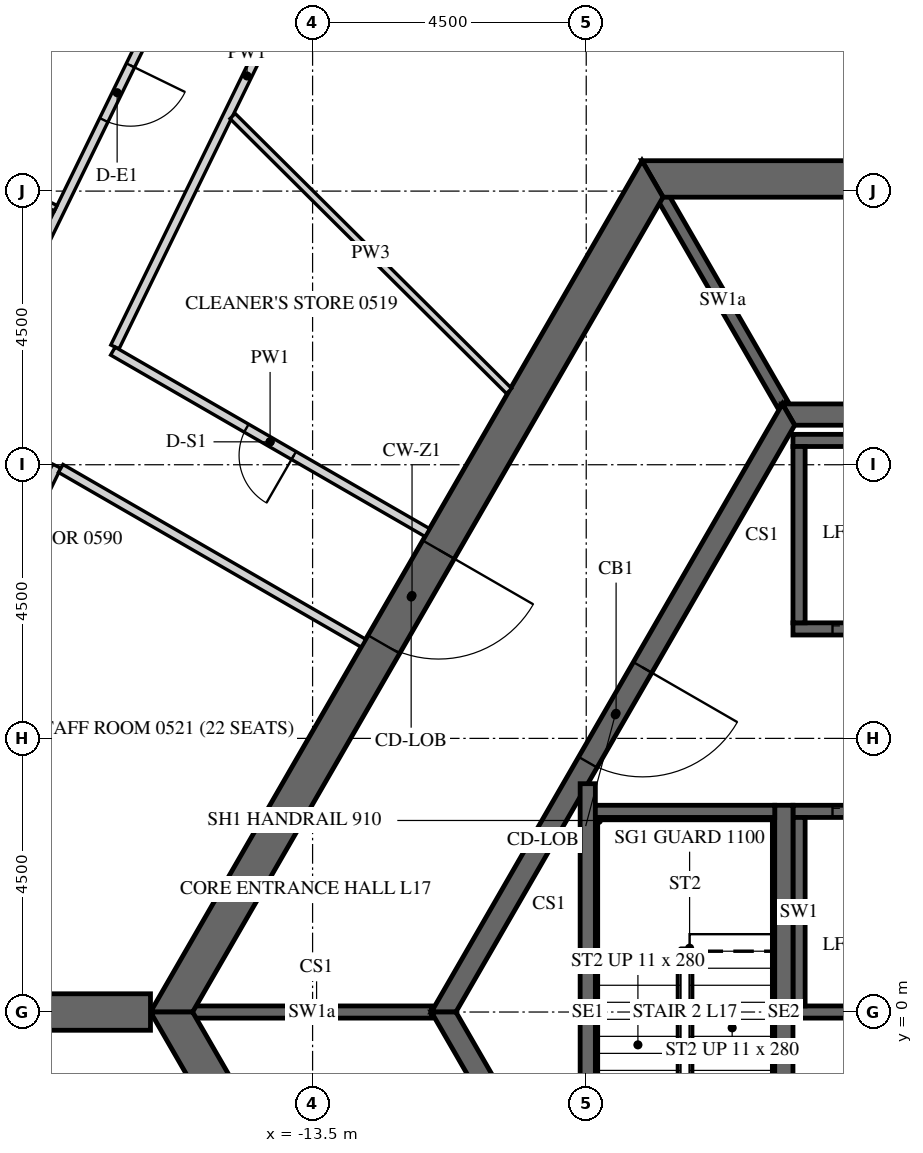
"""IFC4 building model, lengths in metres.
Left out: names, types, materials, properties, quantities, classifications, styles, units other than length and angle.
Written with IfcOpenShell. Run it as: python <this file> out.ifc"""

import sys

from ifc_helpers import new_model, si_unit, direction, frame, frame_2d, origin, place, context, subcontext, project, spatial, polyline, rectangle, outline, extrude, element, fill, save


model = new_model("IFC4")
c1 = context("Model", 3, precision=1e-05, world=origin(), true_north=direction((0.0, 1.0)))
c2 = subcontext(c1, "Body", "Model", "MODEL_VIEW")
j1 = project(units=[si_unit("LENGTHUNIT", "METRE"), si_unit("PLANEANGLEUNIT", "RADIAN")], contexts=[c1])
p1 = place(None, origin())
s1 = spatial("IfcSite", under=j1, at=p1, CompositionType="ELEMENT")
p2 = place(p1, origin())
s2 = spatial("IfcBuilding", under=s1, at=p2, CompositionType="ELEMENT")
p3 = place(p2, frame((0.0, 0.0, 80.4)))
s3 = spatial("IfcBuildingStorey", under=s2, at=p3, CompositionType="ELEMENT", Elevation=80.4)
p4 = place(p3, frame((-7.91, 13.7, -0.15), z_axis=(0.0, 0.0, 1.0), x_axis=(-0.499999880136, -0.866025472988, 0.0)))
e1 = element("IfcWall", 1, at=p4, inside=s3, PredefinedType="SHEAR", context=c2, shape_type="SweptSolid", body=[
    extrude(outline(polyline([(-0.173, -0.3), (15.993, -0.3), (15.646, 0.3), (0.173, 0.3), (-0.173, -0.3)])), origin(), (0.0, 0.0, 1.0), 3.9),
])
p5 = place(p4, frame((7.039, 0.0, 0.15)))
e2 = element("IfcOpeningElement", 2, at=p5, cuts=e1, PredefinedType="OPENING", context=c2, shape_type="SweptSolid", body=[
    extrude(rectangle(XDim=1.8, YDim=2.4, at=frame_2d((0.9, 1.2))), frame((0.0, 0.31, 0.0), z_axis=(0.0, -1.0, 0.0), x_axis=(1.0, 0.0, 0.0)), (0.0, 0.0, 1.0), 0.62),
])
p6 = place(p3, frame((-15.819, 0.0, -0.15), z_axis=(0.0, 0.0, 1.0), x_axis=(0.499999880136, -0.866025472988, 0.0)))
e3 = element("IfcWall", 3, at=p6, inside=s3, PredefinedType="SHEAR", context=c2, shape_type="SweptSolid", body=[
    extrude(outline(polyline([(-0.173, -0.3), (15.993, -0.3), (15.646, 0.3), (0.173, 0.3), (-0.173, -0.3)])), origin(), (0.0, 0.0, 1.0), 3.9),
])
p7 = place(p6, frame((6.981, 0.0, 0.15)))
e4 = element("IfcOpeningElement", 4, at=p7, cuts=e3, PredefinedType="OPENING", context=c2, shape_type="SweptSolid", body=[
    extrude(rectangle(XDim=1.8, YDim=2.4, at=frame_2d((0.9, 1.2))), frame((0.0, 0.31, 0.0), z_axis=(0.0, -1.0, 0.0), x_axis=(1.0, 0.0, 0.0)), (0.0, 0.0, 1.0), 0.62),
])
p8 = place(p3, frame((7.91, 13.7, -0.15), z_axis=(0.0, 0.0, 1.0), x_axis=(-1.0, 0.0, 0.0)))
e5 = element("IfcWall", 5, at=p8, inside=s3, PredefinedType="SHEAR", context=c2, shape_type="SweptSolid", body=[
    extrude(outline(polyline([(-0.173, -0.3), (15.993, -0.3), (15.646, 0.3), (0.173, 0.3), (-0.173, -0.3)])), origin(), (0.0, 0.0, 1.0), 3.9),
])
p9 = place(p8, frame((7.31, 0.0, 0.15)))
e6 = element("IfcOpeningElement", 6, at=p9, cuts=e5, PredefinedType="OPENING", context=c2, shape_type="SweptSolid", body=[
    extrude(rectangle(XDim=1.2, YDim=2.4, at=frame_2d((0.6, 1.2))), frame((0.0, 0.31, 0.0), z_axis=(0.0, -1.0, 0.0), x_axis=(1.0, 0.0, 0.0)), (0.0, 0.0, 1.0), 0.62),
])
p10 = place(p3, frame((-16.166, 0.0, -0.15), z_axis=(0.0, 0.0, 1.0), x_axis=(-1.0, 0.0, 0.0)))
e7 = element("IfcWall", 7, at=p10, inside=s3, PredefinedType="SHEAR", context=c2, shape_type="SweptSolid", body=[
    extrude(rectangle(XDim=16.509, YDim=0.6, at=frame_2d((8.254, 0.0))), origin(), (0.0, 0.0, 1.0), 3.9),
])
p11 = place(p10, frame((7.354, 0.0, 0.15)))
e8 = element("IfcOpeningElement", 8, at=p11, cuts=e7, PredefinedType="OPENING", context=c2, shape_type="SweptSolid", body=[
    extrude(rectangle(XDim=1.8, YDim=2.4, at=frame_2d((0.9, 1.2))), frame((0.0, 0.31, 0.0), z_axis=(0.0, -1.0, 0.0), x_axis=(1.0, 0.0, 0.0)), (0.0, 0.0, 1.0), 0.62),
])
p12 = place(p3, frame((-5.673, 9.825, -0.15), z_axis=(0.0, 0.0, 1.0), x_axis=(-0.499995046907, -0.866028263435, 0.0)))
e9 = element("IfcWall", 9, at=p12, inside=s3, PredefinedType="SHEAR", context=c2, shape_type="SweptSolid", body=[
    extrude(outline(polyline([(-0.101, -0.175), (11.446, -0.175), (11.244, 0.175), (0.101, 0.175), (-0.101, -0.175)])), origin(), (0.0, 0.0, 1.0), 3.9),
])
p13 = place(p12, frame((4.801, 0.0, 0.15)))
e10 = element("IfcOpeningElement", 10, at=p13, cuts=e9, PredefinedType="OPENING", context=c2, shape_type="SweptSolid", body=[
    extrude(rectangle(XDim=1.8, YDim=2.4, at=frame_2d((0.9, 1.2))), frame((0.0, 0.185, 0.0), z_axis=(0.0, -1.0, 0.0), x_axis=(1.0, 0.0, 0.0)), (0.0, 0.0, 1.0), 0.37),
])
p14 = place(p3, frame((-11.345, 0.0, -0.15), z_axis=(0.0, 0.0, 1.0), x_axis=(0.499995046907, -0.866028263435, 0.0)))
e11 = element("IfcWall", 11, at=p14, inside=s3, PredefinedType="SHEAR", context=c2, shape_type="SweptSolid", body=[
    extrude(outline(polyline([(-0.101, -0.175), (11.446, -0.175), (11.244, 0.175), (0.101, 0.175), (-0.101, -0.175)])), origin(), (0.0, 0.0, 1.0), 3.9),
])
p15 = place(p14, frame((4.744, 0.0, 0.15)))
e12 = element("IfcOpeningElement", 12, at=p15, cuts=e11, PredefinedType="OPENING", context=c2, shape_type="SweptSolid", body=[
    extrude(rectangle(XDim=1.8, YDim=2.4, at=frame_2d((0.9, 1.2))), frame((0.0, 0.185, 0.0), z_axis=(0.0, -1.0, 0.0), x_axis=(1.0, 0.0, 0.0)), (0.0, 0.0, 1.0), 0.37),
])
p16 = place(p3, frame((5.673, 9.825, -0.15), z_axis=(0.0, 0.0, 1.0), x_axis=(-1.0, 0.0, 0.0)))
e13 = element("IfcWall", 13, at=p16, inside=s3, PredefinedType="SHEAR", context=c2, shape_type="SweptSolid", body=[
    extrude(outline(polyline([(-0.101, -0.175), (11.446, -0.175), (11.244, 0.175), (0.101, 0.175), (-0.101, -0.175)])), origin(), (0.0, 0.0, 1.0), 3.9),
])
p17 = place(p3, frame((-5.6, 6.3, -0.25), z_axis=(0.0, 0.0, 1.0), x_axis=(1.0, 0.0, 0.0)))
e14 = element("IfcWall", 14, at=p17, inside=s3, PredefinedType="SHEAR", context=c2, shape_type="SweptSolid", body=[
    extrude(rectangle(XDim=11.2, YDim=0.2, at=frame_2d((5.6, 0.0))), origin(), (0.0, 0.0, 1.0), 3.9),
])
p18 = place(p17, frame((0.65, 0.0, 0.25)))
e15 = element("IfcOpeningElement", 15, at=p18, cuts=e14, PredefinedType="OPENING", context=c2, shape_type="SweptSolid", body=[
    extrude(rectangle(XDim=1.1, YDim=2.1, at=frame_2d((0.55, 1.05))), frame((0.0, 0.11, 0.0), z_axis=(0.0, -1.0, 0.0), x_axis=(1.0, 0.0, 0.0)), (0.0, 0.0, 1.0), 0.22),
])
p19 = place(p17, frame((2.85, 0.0, 0.25)))
e16 = element("IfcOpeningElement", 16, at=p19, cuts=e14, PredefinedType="OPENING", context=c2, shape_type="SweptSolid", body=[
    extrude(rectangle(XDim=1.1, YDim=2.1, at=frame_2d((0.55, 1.05))), frame((0.0, 0.11, 0.0), z_axis=(0.0, -1.0, 0.0), x_axis=(1.0, 0.0, 0.0)), (0.0, 0.0, 1.0), 0.22),
])
p20 = place(p17, frame((5.05, 0.0, 0.25)))
e17 = element("IfcOpeningElement", 17, at=p20, cuts=e14, PredefinedType="OPENING", context=c2, shape_type="SweptSolid", body=[
    extrude(rectangle(XDim=1.1, YDim=2.1, at=frame_2d((0.55, 1.05))), frame((0.0, 0.11, 0.0), z_axis=(0.0, -1.0, 0.0), x_axis=(1.0, 0.0, 0.0)), (0.0, 0.0, 1.0), 0.22),
])
p21 = place(p17, frame((7.25, 0.0, 0.25)))
e18 = element("IfcOpeningElement", 18, at=p21, cuts=e14, PredefinedType="OPENING", context=c2, shape_type="SweptSolid", body=[
    extrude(rectangle(XDim=1.1, YDim=2.1, at=frame_2d((0.55, 1.05))), frame((0.0, 0.11, 0.0), z_axis=(0.0, -1.0, 0.0), x_axis=(1.0, 0.0, 0.0)), (0.0, 0.0, 1.0), 0.22),
])
p22 = place(p17, frame((9.45, 0.0, 0.25)))
e19 = element("IfcOpeningElement", 19, at=p22, cuts=e14, PredefinedType="OPENING", context=c2, shape_type="SweptSolid", body=[
    extrude(rectangle(XDim=1.1, YDim=2.1, at=frame_2d((0.55, 1.05))), frame((0.0, 0.11, 0.0), z_axis=(0.0, -1.0, 0.0), x_axis=(1.0, 0.0, 0.0)), (0.0, 0.0, 1.0), 0.22),
])
p23 = place(p3, frame((-5.6, 9.4, -0.25), z_axis=(0.0, 0.0, 1.0), x_axis=(1.0, 0.0, 0.0)))
e20 = element("IfcWall", 20, at=p23, inside=s3, PredefinedType="SHEAR", context=c2, shape_type="SweptSolid", body=[
    extrude(rectangle(XDim=11.2, YDim=0.2, at=frame_2d((5.6, 0.0))), origin(), (0.0, 0.0, 1.0), 3.9),
])
p24 = place(p3, frame((-5.5, 6.4, -0.25), z_axis=(0.0, 0.0, 1.0), x_axis=(0.0, 1.0, 0.0)))
e21 = element("IfcWall", 21, at=p24, inside=s3, PredefinedType="SHEAR", context=c2, shape_type="SweptSolid", body=[
    extrude(rectangle(XDim=2.9, YDim=0.2, at=frame_2d((1.45, 0.0))), origin(), (0.0, 0.0, 1.0), 3.9),
])
p25 = place(p3, frame((-5.6, 3.3, -0.25), z_axis=(0.0, 0.0, 1.0), x_axis=(1.0, 0.0, 0.0)))
e22 = element("IfcWall", 22, at=p25, inside=s3, PredefinedType="SHEAR", context=c2, shape_type="SweptSolid", body=[
    extrude(rectangle(XDim=11.2, YDim=0.2, at=frame_2d((5.6, 0.0))), origin(), (0.0, 0.0, 1.0), 3.9),
])
p26 = place(p25, frame((0.65, 0.0, 0.25)))
e23 = element("IfcOpeningElement", 23, at=p26, cuts=e22, PredefinedType="OPENING", context=c2, shape_type="SweptSolid", body=[
    extrude(rectangle(XDim=1.1, YDim=2.1, at=frame_2d((0.55, 1.05))), frame((0.0, 0.11, 0.0), z_axis=(0.0, -1.0, 0.0), x_axis=(1.0, 0.0, 0.0)), (0.0, 0.0, 1.0), 0.22),
])
p27 = place(p25, frame((2.85, 0.0, 0.25)))
e24 = element("IfcOpeningElement", 24, at=p27, cuts=e22, PredefinedType="OPENING", context=c2, shape_type="SweptSolid", body=[
    extrude(rectangle(XDim=1.1, YDim=2.1, at=frame_2d((0.55, 1.05))), frame((0.0, 0.11, 0.0), z_axis=(0.0, -1.0, 0.0), x_axis=(1.0, 0.0, 0.0)), (0.0, 0.0, 1.0), 0.22),
])
p28 = place(p25, frame((5.05, 0.0, 0.25)))
e25 = element("IfcOpeningElement", 25, at=p28, cuts=e22, PredefinedType="OPENING", context=c2, shape_type="SweptSolid", body=[
    extrude(rectangle(XDim=1.1, YDim=2.1, at=frame_2d((0.55, 1.05))), frame((0.0, 0.11, 0.0), z_axis=(0.0, -1.0, 0.0), x_axis=(1.0, 0.0, 0.0)), (0.0, 0.0, 1.0), 0.22),
])
p29 = place(p25, frame((7.25, 0.0, 0.25)))
e26 = element("IfcOpeningElement", 26, at=p29, cuts=e22, PredefinedType="OPENING", context=c2, shape_type="SweptSolid", body=[
    extrude(rectangle(XDim=1.1, YDim=2.1, at=frame_2d((0.55, 1.05))), frame((0.0, 0.11, 0.0), z_axis=(0.0, -1.0, 0.0), x_axis=(1.0, 0.0, 0.0)), (0.0, 0.0, 1.0), 0.22),
])
p30 = place(p25, frame((9.45, 0.0, 0.25)))
e27 = element("IfcOpeningElement", 27, at=p30, cuts=e22, PredefinedType="OPENING", context=c2, shape_type="SweptSolid", body=[
    extrude(rectangle(XDim=1.1, YDim=2.1, at=frame_2d((0.55, 1.05))), frame((0.0, 0.11, 0.0), z_axis=(0.0, -1.0, 0.0), x_axis=(1.0, 0.0, 0.0)), (0.0, 0.0, 1.0), 0.22),
])
p31 = place(p3, frame((-5.6, 0.0, -0.25), z_axis=(0.0, 0.0, 1.0), x_axis=(1.0, 0.0, 0.0)))
e28 = element("IfcWall", 28, at=p31, inside=s3, PredefinedType="SHEAR", context=c2, shape_type="SweptSolid", body=[
    extrude(rectangle(XDim=11.2, YDim=0.2, at=frame_2d((5.6, 0.0))), origin(), (0.0, 0.0, 1.0), 3.9),
])
p32 = place(p3, frame((-5.5, 0.1, -0.25), z_axis=(0.0, 0.0, 1.0), x_axis=(0.0, 1.0, 0.0)))
e29 = element("IfcWall", 29, at=p32, inside=s3, PredefinedType="SHEAR", context=c2, shape_type="SweptSolid", body=[
    extrude(rectangle(XDim=3.1, YDim=0.2, at=frame_2d((1.55, 0.0))), origin(), (0.0, 0.0, 1.0), 3.9),
])
p33 = place(p3, frame((-5.773, 10.0, -0.15), z_axis=(0.0, 0.0, 1.0), x_axis=(-0.500038251005, 0.86600331843, 0.0)))
e30 = element("IfcWall", 30, at=p33, inside=s3, PredefinedType="SHEAR", context=c2, shape_type="SweptSolid", body=[
    extrude(rectangle(XDim=3.926, YDim=0.2, at=frame_2d((1.963, 0.0))), origin(), (0.0, 0.0, 1.0), 3.9),
])
p34 = place(p3, frame((-11.547, 0.0, -0.15), z_axis=(0.0, 0.0, 1.0), x_axis=(-1.0, 0.0, 0.0)))
e31 = element("IfcWall", 31, at=p34, inside=s3, PredefinedType="SHEAR", context=c2, shape_type="SweptSolid", body=[
    extrude(rectangle(XDim=3.926, YDim=0.2, at=frame_2d((1.963, 0.0))), origin(), (0.0, 0.0, 1.0), 3.9),
])
p35 = place(p3, frame((-5.75, -3.4, -0.25), z_axis=(0.0, 0.0, 1.0), x_axis=(0.0, 1.0, 0.0)))
e32 = element("IfcWall", 32, at=p35, inside=s3, PredefinedType="SHEAR", context=c2, shape_type="SweptSolid", body=[
    extrude(rectangle(XDim=6.8, YDim=0.3, at=frame_2d((3.4, 0.0))), origin(), (0.0, 0.0, 1.0), 3.9),
])
p36 = place(p3, frame((-8.975, -3.755, -0.25), z_axis=(0.0, 0.0, 1.0), x_axis=(0.0, 1.0, 0.0)))
e33 = element("IfcWall", 33, at=p36, inside=s3, PredefinedType="SHEAR", context=c2, shape_type="SweptSolid", body=[
    extrude(rectangle(XDim=7.51, YDim=0.25, at=frame_2d((3.755, 0.0))), origin(), (0.0, 0.0, 1.0), 3.9),
])
p37 = place(p3, frame((-8.85, 3.3, -0.25), z_axis=(0.0, 0.0, 1.0), x_axis=(1.0, 0.0, 0.0)))
e34 = element("IfcWall", 34, at=p37, inside=s3, PredefinedType="SHEAR", context=c2, shape_type="SweptSolid", body=[
    extrude(rectangle(XDim=2.95, YDim=0.2, at=frame_2d((1.475, 0.0))), origin(), (0.0, 0.0, 1.0), 3.9),
])
p38 = place(p3, frame((-13.565, 21.575, 0.0), z_axis=(0.0, 0.0, 1.0), x_axis=(-0.438380787243, -0.898789344272, 0.0)))
e35 = element("IfcWall", 35, at=p38, inside=s3, PredefinedType="PARTITIONING", context=c2, shape_type="SweptSolid", body=[
    extrude(rectangle(XDim=21.668, YDim=0.15, at=frame_2d((10.834, 0.0))), origin(), (0.0, 0.0, 1.0), 2.988),
])
p39 = place(p38, frame((6.684, 0.0, 0.0)))
e36 = element("IfcOpeningElement", 36, at=p39, cuts=e35, PredefinedType="OPENING", context=c2, shape_type="SweptSolid", body=[
    extrude(rectangle(XDim=1.0, YDim=2.1, at=frame_2d((0.5, 1.05))), frame((0.0, 0.085, 0.0), z_axis=(0.0, -1.0, 0.0), x_axis=(1.0, 0.0, 0.0)), (0.0, 0.0, 1.0), 0.17),
])
p40 = place(p38, frame((17.651, 0.0, 0.0)))
e37 = element("IfcOpeningElement", 37, at=p40, cuts=e35, PredefinedType="OPENING", context=c2, shape_type="SweptSolid", body=[
    extrude(rectangle(XDim=1.0, YDim=2.1, at=frame_2d((0.5, 1.05))), frame((0.0, 0.085, 0.0), z_axis=(0.0, -1.0, 0.0), x_axis=(1.0, 0.0, 0.0)), (0.0, 0.0, 1.0), 0.17),
])
p41 = place(p3, frame((-16.751, 10.937, 0.0), z_axis=(0.0, 0.0, 1.0), x_axis=(0.438378523504, 0.898790448397, 0.0)))
e38 = element("IfcWall", 38, at=p41, inside=s3, PredefinedType="PARTITIONING", context=c2, shape_type="SweptSolid", body=[
    extrude(rectangle(XDim=9.917, YDim=0.15, at=frame_2d((4.958, 0.0))), origin(), (0.0, 0.0, 1.0), 2.988),
])
p42 = place(p3, frame((-11.614, 7.884, 0.0), z_axis=(0.0, 0.0, 1.0), x_axis=(-0.86603508376, 0.499983233416, 0.0)))
e39 = element("IfcWall", 39, at=p42, inside=s3, PredefinedType="PARTITIONING", context=c2, shape_type="SweptSolid", body=[
    extrude(rectangle(XDim=5.97, YDim=0.15, at=frame_2d((2.985, 0.0))), origin(), (0.0, 0.0, 1.0), 2.988),
])
p43 = place(p42, frame((2.535, 0.0, 0.0)))
e40 = element("IfcOpeningElement", 40, at=p43, cuts=e39, PredefinedType="OPENING", context=c2, shape_type="SweptSolid", body=[
    extrude(rectangle(XDim=0.9, YDim=2.1, at=frame_2d((0.45, 1.05))), frame((0.0, 0.085, 0.0), z_axis=(0.0, -1.0, 0.0), x_axis=(1.0, 0.0, 0.0)), (0.0, 0.0, 1.0), 0.17),
])
p44 = place(p3, frame((-21.885, 0.41, 0.0), z_axis=(0.0, 0.0, 1.0), x_axis=(0.43837064471, 0.898794291179, 0.0)))
e41 = element("IfcWall", 41, at=p44, inside=s3, PredefinedType="PARTITIONING", context=c2, shape_type="SweptSolid", body=[
    extrude(rectangle(XDim=9.532, YDim=0.15, at=frame_2d((4.766, 0.0))), origin(), (0.0, 0.0, 1.0), 2.988),
])
p45 = place(p44, frame((4.316, 0.0, 0.0)))
e42 = element("IfcOpeningElement", 42, at=p45, cuts=e41, PredefinedType="OPENING", context=c2, shape_type="SweptSolid", body=[
    extrude(rectangle(XDim=0.9, YDim=2.1, at=frame_2d((0.45, 1.05))), frame((0.0, 0.085, 0.0), z_axis=(0.0, -1.0, 0.0), x_axis=(1.0, 0.0, 0.0)), (0.0, 0.0, 1.0), 0.17),
])
p46 = place(p3, frame((-17.642, 8.94, 0.0), z_axis=(0.0, 0.0, 1.0), x_axis=(0.866017948234, -0.500012913169, 0.0)))
e43 = element("IfcWall", 43, at=p46, inside=s3, PredefinedType="PARTITIONING", context=c2, shape_type="SweptSolid", body=[
    extrude(rectangle(XDim=5.748, YDim=0.15, at=frame_2d((2.874, 0.0))), origin(), (0.0, 0.0, 1.0), 2.988),
])
p47 = place(p3, frame((-20.308, 14.479, 0.0), z_axis=(0.0, 0.0, 1.0), x_axis=(0.898799457159, -0.438360052708, 0.0)))
e44 = element("IfcWall", 44, at=p47, inside=s3, PredefinedType="PARTITIONING", context=c2, shape_type="SweptSolid", body=[
    extrude(rectangle(XDim=2.875, YDim=0.1, at=frame_2d((1.438, 0.0))), origin(), (0.0, 0.0, 1.0), 2.988),
])
p48 = place(p47, frame((0.9, 0.0, 0.0)))
e45 = element("IfcOpeningElement", 45, at=p48, cuts=e44, PredefinedType="OPENING", context=c2, shape_type="SweptSolid", body=[
    extrude(rectangle(XDim=0.8, YDim=2.1, at=frame_2d((0.4, 1.05))), frame((0.0, 0.06, 0.0), z_axis=(0.0, -1.0, 0.0), x_axis=(1.0, 0.0, 0.0)), (0.0, 0.0, 1.0), 0.12),
])
p49 = place(p3, frame((-14.815, 14.734, 0.0), z_axis=(0.0, 0.0, 1.0), x_axis=(0.709046184876, -0.705162043584, 0.0)))
e46 = element("IfcWall", 46, at=p49, inside=s3, PredefinedType="PARTITIONING", context=c2, shape_type="SweptSolid", body=[
    extrude(rectangle(XDim=6.411, YDim=0.12, at=frame_2d((3.206, 0.0))), origin(), (0.0, 0.0, 1.0), 2.988),
])
p50 = place(p5, origin())
e47 = element("IfcDoor", 47, at=p50, inside=s3, OperationType="DOUBLE_DOOR_SINGLE_SWING", PredefinedType="DOOR", context=c2, shape_type="SweptSolid", body=[
    extrude(rectangle(XDim=1.8, YDim=2.4, at=frame_2d((0.9, 1.2))), frame((0.0, 0.025, 0.0), z_axis=(0.0, -1.0, 0.0), x_axis=(1.0, 0.0, 0.0)), (0.0, 0.0, 1.0), 0.05),
])
fill(e2, e47)
p51 = place(p13, origin())
e48 = element("IfcDoor", 48, at=p51, inside=s3, OperationType="DOUBLE_DOOR_SINGLE_SWING", PredefinedType="DOOR", context=c2, shape_type="SweptSolid", body=[
    extrude(rectangle(XDim=1.8, YDim=2.4, at=frame_2d((0.9, 1.2))), frame((0.0, 0.025, 0.0), z_axis=(0.0, -1.0, 0.0), x_axis=(1.0, 0.0, 0.0)), (0.0, 0.0, 1.0), 0.05),
])
fill(e10, e48)
p52 = place(p18, origin())
e49 = element("IfcDoor", 49, at=p52, inside=s3, OperationType="SLIDING_TO_LEFT", PredefinedType="DOOR", context=c2, shape_type="SweptSolid", body=[
    extrude(rectangle(XDim=1.1, YDim=2.1, at=frame_2d((0.55, 1.05))), frame((0.0, 0.025, 0.0), z_axis=(0.0, -1.0, 0.0), x_axis=(1.0, 0.0, 0.0)), (0.0, 0.0, 1.0), 0.05),
])
fill(e15, e49)
p53 = place(p26, origin())
e50 = element("IfcDoor", 50, at=p53, inside=s3, OperationType="SLIDING_TO_LEFT", PredefinedType="DOOR", context=c2, shape_type="SweptSolid", body=[
    extrude(rectangle(XDim=1.1, YDim=2.1, at=frame_2d((0.55, 1.05))), frame((0.0, 0.025, 0.0), z_axis=(0.0, -1.0, 0.0), x_axis=(1.0, 0.0, 0.0)), (0.0, 0.0, 1.0), 0.05),
])
fill(e23, e50)
p54 = place(p39, origin())
e51 = element("IfcDoor", 51, at=p54, inside=s3, OperationType="SINGLE_SWING_LEFT", PredefinedType="DOOR", context=c2, shape_type="SweptSolid", body=[
    extrude(rectangle(XDim=1.0, YDim=2.1, at=frame_2d((0.5, 1.05))), frame((0.0, 0.025, 0.0), z_axis=(0.0, -1.0, 0.0), x_axis=(1.0, 0.0, 0.0)), (0.0, 0.0, 1.0), 0.05),
])
fill(e36, e51)
p55 = place(p43, origin())
e52 = element("IfcDoor", 52, at=p55, inside=s3, OperationType="SINGLE_SWING_RIGHT", PredefinedType="DOOR", context=c2, shape_type="SweptSolid", body=[
    extrude(rectangle(XDim=0.9, YDim=2.1, at=frame_2d((0.45, 1.05))), frame((0.0, 0.025, 0.0), z_axis=(0.0, -1.0, 0.0), x_axis=(1.0, 0.0, 0.0)), (0.0, 0.0, 1.0), 0.05),
])
fill(e40, e52)
save(model, sys.argv[1])
